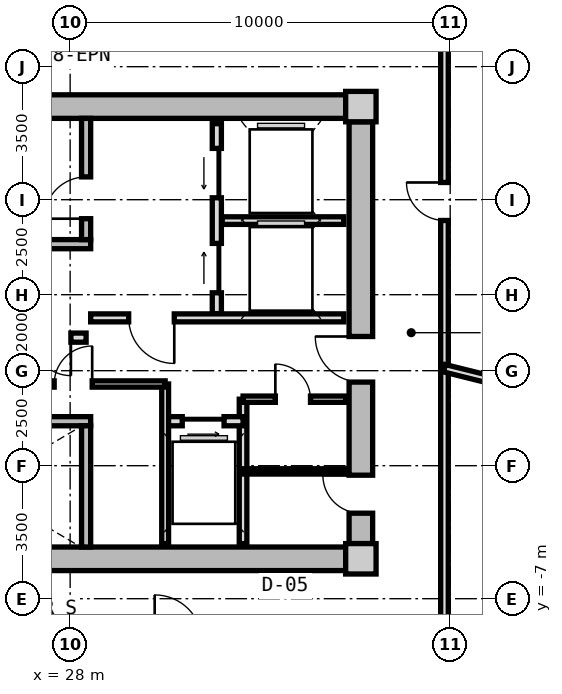
"""IFC4 building model, lengths in metres.
Left out: names, types, materials, properties, quantities, classifications, styles, units other than length and angle.
Written with IfcOpenShell. Run it as: python <this file> out.ifc"""

import sys

from ifc_helpers import new_model, si_unit, direction, frame, frame_2d, origin, origin_2d, place, context, subcontext, project, spatial, rectangle, extrude, source, transform, mapped, element, fill, save


model = new_model("IFC4")
c1 = context("Model", 3, precision=1e-05, world=origin(), true_north=direction((0.0, 1.0)))
c2 = subcontext(c1, "Body", "Model", "MODEL_VIEW")
j1 = project(units=[si_unit("LENGTHUNIT", "METRE"), si_unit("PLANEANGLEUNIT", "RADIAN")], contexts=[c1])
p1 = place(None, origin())
s1 = spatial("IfcSite", under=j1, at=p1, CompositionType="ELEMENT")
p2 = place(p1, origin())
s2 = spatial("IfcBuilding", under=s1, at=p2, CompositionType="ELEMENT")
p3 = place(p2, frame((0.0, 0.0, 186.15)))
s3 = spatial("IfcBuildingStorey", under=s2, at=p3, CompositionType="ELEMENT", Elevation=186.15)
m1 = source(origin(), c2, "Body", "SweptSolid", [
    extrude(rectangle(XDim=0.8, YDim=0.8, at=origin_2d()), origin(), (0.0, 0.0, 1.0), 4.5),
])
for number, where, z_axis, x_axis in (
    (1, (35.65, -5.95, 0.0), (0.0, 0.0, 1.0), (1.0, 0.0, 0.0)),
    (2, (35.65, 5.95, 0.0), (0.0, 0.0, 1.0), (1.0, 0.0, 0.0)),
):
    element("IfcColumn", number, at=place(p3, frame(where, z_axis=z_axis, x_axis=x_axis)), inside=s3, PredefinedType="COLUMN", context=c2, shape_type="MappedRepresentation", body=[
        mapped(m1, transform((0.0, 0.0, 0.0), x_axis=(1.0, 0.0, 0.0), y_axis=(0.0, 1.0, 0.0), z_axis=(0.0, 0.0, 1.0), scale=1.0)),
    ])
m2 = source(origin(), c2, "Body", "SweptSolid", [
    extrude(rectangle(XDim=14.5, YDim=0.62, at=frame_2d((7.25, 0.0))), origin(), (0.0, 0.0, 1.0), 4.08),
])
for number, where, z_axis, x_axis in (
    (3, (20.75, 5.95, 0.0), (0.0, 0.0, 1.0), (1.0, 0.0, 0.0)),
    (4, (35.25, -5.95, 0.0), (0.0, 0.0, 1.0), (-1.0, 0.0, 0.0)),
):
    element("IfcWall", number, at=place(p3, frame(where, z_axis=z_axis, x_axis=x_axis)), inside=s3, PredefinedType="SHEAR", context=c2, shape_type="MappedRepresentation", body=[
        mapped(m2, transform((0.0, 0.0, 0.0), x_axis=(1.0, 0.0, 0.0), y_axis=(0.0, 1.0, 0.0), z_axis=(0.0, 0.0, 1.0), scale=1.0)),
    ])
m3 = source(origin(), c2, "Body", "SweptSolid", [
    extrude(rectangle(XDim=11.1, YDim=0.62, at=frame_2d((5.55, 0.0))), origin(), (0.0, 0.0, 1.0), 4.08),
])
p4 = place(p3, frame((35.65, 5.55, 0.0), z_axis=(0.0, 0.0, 1.0), x_axis=(0.0, -1.0, 0.0)))
e5 = element("IfcWall", 5, at=p4, inside=s3, PredefinedType="SHEAR", context=c2, shape_type="MappedRepresentation", body=[
    mapped(m3, transform((0.0, 0.0, 0.0), x_axis=(1.0, 0.0, 0.0), y_axis=(0.0, 1.0, 0.0), z_axis=(0.0, 0.0, 1.0), scale=1.0)),
])
p5 = place(p4, frame((5.65, 0.0, 0.0)))
e6 = element("IfcOpeningElement", 6, at=p5, cuts=e5, PredefinedType="OPENING", context=c2, shape_type="SweptSolid", body=[
    extrude(rectangle(XDim=1.2, YDim=2.15, at=frame_2d((0.6, 1.075))), frame((0.0, 0.32, 0.0), z_axis=(0.0, -1.0, 0.0), x_axis=(1.0, 0.0, 0.0)), (0.0, 0.0, 1.0), 0.64),
])
p6 = place(p4, frame((9.3, 0.0, 0.0)))
e7 = element("IfcOpeningElement", 7, at=p6, cuts=e5, PredefinedType="OPENING", context=c2, shape_type="SweptSolid", body=[
    extrude(rectangle(XDim=1.0, YDim=2.1, at=frame_2d((0.5, 1.05))), frame((0.0, 0.32, 0.0), z_axis=(0.0, -1.0, 0.0), x_axis=(1.0, 0.0, 0.0)), (0.0, 0.0, 1.0), 0.64),
])
m4 = source(origin(), c2, "Body", "SweptSolid", [
    extrude(rectangle(XDim=7.88, YDim=0.24, at=frame_2d((3.94, 0.0))), origin(), (0.0, 0.0, 1.0), 4.08),
])
p7 = place(p3, frame((20.66, 2.33, 0.0), z_axis=(0.0, 0.0, 1.0), x_axis=(1.0, 0.0, 0.0)))
e8 = element("IfcWall", 8, at=p7, inside=s3, PredefinedType="PARTITIONING", context=c2, shape_type="MappedRepresentation", body=[
    mapped(m4, transform((0.0, 0.0, 0.0), x_axis=(1.0, 0.0, 0.0), y_axis=(0.0, 1.0, 0.0), z_axis=(0.0, 0.0, 1.0), scale=1.0)),
])
m5 = source(origin(), c2, "Body", "SweptSolid", [
    extrude(rectangle(XDim=3.19, YDim=0.24, at=frame_2d((1.595, 0.0))), origin(), (0.0, 0.0, 1.0), 4.08),
])
p8 = place(p3, frame((28.42, 2.45, 0.0), z_axis=(0.0, 0.0, 1.0), x_axis=(0.0, 1.0, 0.0)))
e9 = element("IfcWall", 9, at=p8, inside=s3, PredefinedType="PARTITIONING", context=c2, shape_type="MappedRepresentation", body=[
    mapped(m5, transform((0.0, 0.0, 0.0), x_axis=(1.0, 0.0, 0.0), y_axis=(0.0, 1.0, 0.0), z_axis=(0.0, 0.0, 1.0), scale=1.0)),
])
p9 = place(p8, frame((0.55, 0.0, 0.0)))
e10 = element("IfcOpeningElement", 10, at=p9, cuts=e9, PredefinedType="OPENING", context=c2, shape_type="SweptSolid", body=[
    extrude(rectangle(XDim=1.1, YDim=2.15, at=frame_2d((0.55, 1.075))), frame((0.0, 0.13, 0.0), z_axis=(0.0, -1.0, 0.0), x_axis=(1.0, 0.0, 0.0)), (0.0, 0.0, 1.0), 0.26),
])
p10 = place(p3, frame((20.66, -2.33, 0.0), z_axis=(0.0, 0.0, 1.0), x_axis=(1.0, 0.0, 0.0)))
e11 = element("IfcWall", 11, at=p10, inside=s3, PredefinedType="PARTITIONING", context=c2, shape_type="MappedRepresentation", body=[
    mapped(m4, transform((0.0, 0.0, 0.0), x_axis=(1.0, 0.0, 0.0), y_axis=(0.0, 1.0, 0.0), z_axis=(0.0, 0.0, 1.0), scale=1.0)),
])
p11 = place(p10, frame((1.0, 0.0, 0.0)))
e12 = element("IfcOpeningElement", 12, at=p11, cuts=e11, PredefinedType="OPENING", context=c2, shape_type="SweptSolid", body=[
    extrude(rectangle(XDim=1.1, YDim=2.15, at=frame_2d((0.55, 1.075))), frame((0.0, 0.13, 0.0), z_axis=(0.0, -1.0, 0.0), x_axis=(1.0, 0.0, 0.0)), (0.0, 0.0, 1.0), 0.26),
])
p12 = place(p3, frame((28.42, -5.64, 0.0), z_axis=(0.0, 0.0, 1.0), x_axis=(0.0, 1.0, 0.0)))
e13 = element("IfcWall", 13, at=p12, inside=s3, PredefinedType="PARTITIONING", context=c2, shape_type="MappedRepresentation", body=[
    mapped(m5, transform((0.0, 0.0, 0.0), x_axis=(1.0, 0.0, 0.0), y_axis=(0.0, 1.0, 0.0), z_axis=(0.0, 0.0, 1.0), scale=1.0)),
])
m6 = source(origin(), c2, "Body", "SweptSolid", [
    extrude(rectangle(XDim=5.0, YDim=0.24, at=frame_2d((2.5, 0.0))), origin(), (0.0, 0.0, 1.0), 4.065),
])
p13 = place(p3, frame((31.86, 0.5, 0.0), z_axis=(0.0, 0.0, 1.0), x_axis=(0.0, 1.0, 0.0)))
e14 = element("IfcWall", 14, at=p13, inside=s3, PredefinedType="PARTITIONING", context=c2, shape_type="MappedRepresentation", body=[
    mapped(m6, transform((0.0, 0.0, 0.0), x_axis=(1.0, 0.0, 0.0), y_axis=(0.0, 1.0, 0.0), z_axis=(0.0, 0.0, 1.0), scale=1.0)),
])
p14 = place(p13, frame((3.05, 0.0, 0.0)))
e15 = element("IfcOpeningElement", 15, at=p14, cuts=e14, PredefinedType="OPENING", context=c2, shape_type="SweptSolid", body=[
    extrude(rectangle(XDim=1.3, YDim=2.2, at=frame_2d((0.65, 1.1))), frame((0.0, 0.13, 0.0), z_axis=(0.0, -1.0, 0.0), x_axis=(1.0, 0.0, 0.0)), (0.0, 0.0, 1.0), 0.26),
])
p15 = place(p13, frame((0.55, 0.0, 0.0)))
e16 = element("IfcOpeningElement", 16, at=p15, cuts=e14, PredefinedType="OPENING", context=c2, shape_type="SweptSolid", body=[
    extrude(rectangle(XDim=1.3, YDim=2.2, at=frame_2d((0.65, 1.1))), frame((0.0, 0.13, 0.0), z_axis=(0.0, -1.0, 0.0), x_axis=(1.0, 0.0, 0.0)), (0.0, 0.0, 1.0), 0.26),
])
m7 = source(origin(), c2, "Body", "SweptSolid", [
    extrude(rectangle(XDim=3.2, YDim=0.2, at=frame_2d((1.6, 0.0))), origin(), (0.0, 0.0, 1.0), 4.065),
])
p16 = place(p3, frame((32.0, 2.95, 0.0), z_axis=(0.0, 0.0, 1.0), x_axis=(1.0, 0.0, 0.0)))
e17 = element("IfcWall", 17, at=p16, inside=s3, PredefinedType="PARTITIONING", context=c2, shape_type="MappedRepresentation", body=[
    mapped(m7, transform((0.0, 0.0, 0.0), x_axis=(1.0, 0.0, 0.0), y_axis=(0.0, 1.0, 0.0), z_axis=(0.0, 0.0, 1.0), scale=1.0)),
])
m8 = source(origin(), c2, "Body", "SweptSolid", [
    extrude(rectangle(XDim=6.66, YDim=0.21, at=frame_2d((3.33, 0.0))), origin(), (0.0, 0.0, 1.0), 4.065),
])
p17 = place(p3, frame((28.54, 0.39, 0.0), z_axis=(0.0, 0.0, 1.0), x_axis=(1.0, 0.0, 0.0)))
e18 = element("IfcWall", 18, at=p17, inside=s3, PredefinedType="PARTITIONING", context=c2, shape_type="MappedRepresentation", body=[
    mapped(m8, transform((0.0, 0.0, 0.0), x_axis=(1.0, 0.0, 0.0), y_axis=(0.0, 1.0, 0.0), z_axis=(0.0, 0.0, 1.0), scale=1.0)),
])
p18 = place(p17, frame((1.0, 0.0, 0.0)))
e19 = element("IfcOpeningElement", 19, at=p18, cuts=e18, PredefinedType="OPENING", context=c2, shape_type="SweptSolid", body=[
    extrude(rectangle(XDim=1.2, YDim=2.15, at=frame_2d((0.6, 1.075))), frame((0.0, 0.115, 0.0), z_axis=(0.0, -1.0, 0.0), x_axis=(1.0, 0.0, 0.0)), (0.0, 0.0, 1.0), 0.23),
])
m9 = source(origin(), c2, "Body", "SweptSolid", [
    extrude(rectangle(XDim=7.62, YDim=0.24, at=frame_2d((3.81, 0.0))), origin(), (0.0, 0.0, 1.0), 4.065),
])
p19 = place(p3, frame((20.8, -0.13, 0.0), z_axis=(0.0, 0.0, 1.0), x_axis=(1.0, 0.0, 0.0)))
e20 = element("IfcWall", 20, at=p19, inside=s3, PredefinedType="PARTITIONING", context=c2, shape_type="MappedRepresentation", body=[
    mapped(m9, transform((0.0, 0.0, 0.0), x_axis=(1.0, 0.0, 0.0), y_axis=(0.0, 1.0, 0.0), z_axis=(0.0, 0.0, 1.0), scale=1.0)),
])
p20 = place(p19, frame((6.22, 0.0, 0.0)))
e21 = element("IfcOpeningElement", 21, at=p20, cuts=e20, PredefinedType="OPENING", context=c2, shape_type="SweptSolid", body=[
    extrude(rectangle(XDim=1.0, YDim=2.1, at=frame_2d((0.5, 1.05))), frame((0.0, 0.13, 0.0), z_axis=(0.0, -1.0, 0.0), x_axis=(1.0, 0.0, 0.0)), (0.0, 0.0, 1.0), 0.26),
])
p21 = place(p19, frame((2.4, 0.0, 0.0)))
e22 = element("IfcOpeningElement", 22, at=p21, cuts=e20, PredefinedType="OPENING", context=c2, shape_type="SweptSolid", body=[
    extrude(rectangle(XDim=1.0, YDim=2.1, at=frame_2d((0.5, 1.05))), frame((0.0, 0.13, 0.0), z_axis=(0.0, -1.0, 0.0), x_axis=(1.0, 0.0, 0.0)), (0.0, 0.0, 1.0), 0.26),
])
m10 = source(origin(), c2, "Body", "SweptSolid", [
    extrude(rectangle(XDim=3.8, YDim=0.2, at=frame_2d((1.9, 0.0))), origin(), (0.0, 0.0, 1.0), 4.065),
])
p22 = place(p3, frame((32.55, -5.55, 0.0), z_axis=(0.0, 0.0, 1.0), x_axis=(0.0, 1.0, 0.0)))
e23 = element("IfcWall", 23, at=p22, inside=s3, PredefinedType="PARTITIONING", context=c2, shape_type="MappedRepresentation", body=[
    mapped(m10, transform((0.0, 0.0, 0.0), x_axis=(1.0, 0.0, 0.0), y_axis=(0.0, 1.0, 0.0), z_axis=(0.0, 0.0, 1.0), scale=1.0)),
])
m11 = source(origin(), c2, "Body", "SweptSolid", [
    extrude(rectangle(XDim=2.05, YDim=0.24, at=frame_2d((1.025, 0.0))), origin(), (0.0, 0.0, 1.0), 4.065),
])
p23 = place(p3, frame((30.5, -2.33, 0.0), z_axis=(0.0, 0.0, 1.0), x_axis=(1.0, 0.0, 0.0)))
e24 = element("IfcWall", 24, at=p23, inside=s3, PredefinedType="PARTITIONING", context=c2, shape_type="MappedRepresentation", body=[
    mapped(m11, transform((0.0, 0.0, 0.0), x_axis=(1.0, 0.0, 0.0), y_axis=(0.0, 1.0, 0.0), z_axis=(0.0, 0.0, 1.0), scale=1.0)),
])
p24 = place(p23, frame((0.45, 0.0, 0.0)))
e25 = element("IfcOpeningElement", 25, at=p24, cuts=e24, PredefinedType="OPENING", context=c2, shape_type="SweptSolid", body=[
    extrude(rectangle(XDim=1.1, YDim=2.2, at=frame_2d((0.55, 1.1))), frame((0.0, 0.13, 0.0), z_axis=(0.0, -1.0, 0.0), x_axis=(1.0, 0.0, 0.0)), (0.0, 0.0, 1.0), 0.26),
])
m12 = source(origin(), c2, "Body", "SweptSolid", [
    extrude(rectangle(XDim=4.2, YDim=0.18, at=frame_2d((2.1, 0.0))), origin(), (0.0, 0.0, 1.0), 4.065),
])
p25 = place(p3, frame((30.5, -5.55, 0.0), z_axis=(0.0, 0.0, 1.0), x_axis=(0.0, 1.0, 0.0)))
e26 = element("IfcWall", 26, at=p25, inside=s3, PredefinedType="PARTITIONING", context=c2, shape_type="MappedRepresentation", body=[
    mapped(m12, transform((0.0, 0.0, 0.0), x_axis=(1.0, 0.0, 0.0), y_axis=(0.0, 1.0, 0.0), z_axis=(0.0, 0.0, 1.0), scale=1.0)),
])
m13 = source(origin(), c2, "Body", "SweptSolid", [
    extrude(rectangle(XDim=4.77, YDim=0.165, at=frame_2d((2.385, 0.0))), origin(), (0.0, 0.0, 1.0), 4.065),
])
p26 = place(p3, frame((25.73, -1.35, 0.0), z_axis=(0.0, 0.0, 1.0), x_axis=(1.0, 0.0, 0.0)))
e27 = element("IfcWall", 27, at=p26, inside=s3, PredefinedType="PARTITIONING", context=c2, shape_type="MappedRepresentation", body=[
    mapped(m13, transform((0.0, 0.0, 0.0), x_axis=(1.0, 0.0, 0.0), y_axis=(0.0, 1.0, 0.0), z_axis=(0.0, 0.0, 1.0), scale=1.0)),
])
p27 = place(p26, frame((1.85, 0.0, 0.0)))
e28 = element("IfcOpeningElement", 28, at=p27, cuts=e27, PredefinedType="OPENING", context=c2, shape_type="SweptSolid", body=[
    extrude(rectangle(XDim=1.0, YDim=2.1, at=frame_2d((0.5, 1.05))), frame((0.0, 0.093, 0.0), z_axis=(0.0, -1.0, 0.0), x_axis=(1.0, 0.0, 0.0)), (0.0, 0.0, 1.0), 0.185),
])
m14 = source(origin(), c2, "Body", "SweptSolid", [
    extrude(rectangle(XDim=2.7, YDim=0.165, at=frame_2d((1.35, 0.0))), origin(), (0.0, 0.0, 1.0), 4.065),
])
p28 = place(p3, frame((32.55, -1.75, 0.0), z_axis=(0.0, 0.0, 1.0), x_axis=(1.0, 0.0, 0.0)))
e29 = element("IfcWall", 29, at=p28, inside=s3, PredefinedType="PARTITIONING", context=c2, shape_type="MappedRepresentation", body=[
    mapped(m14, transform((0.0, 0.0, 0.0), x_axis=(1.0, 0.0, 0.0), y_axis=(0.0, 1.0, 0.0), z_axis=(0.0, 0.0, 1.0), scale=1.0)),
])
p29 = place(p28, frame((0.85, 0.0, 0.0)))
e30 = element("IfcOpeningElement", 30, at=p29, cuts=e29, PredefinedType="OPENING", context=c2, shape_type="SweptSolid", body=[
    extrude(rectangle(XDim=0.925, YDim=2.1, at=frame_2d((0.462, 1.05))), frame((0.0, 0.093, 0.0), z_axis=(0.0, -1.0, 0.0), x_axis=(1.0, 0.0, 0.0)), (0.0, 0.0, 1.0), 0.185),
])
m15 = source(origin(), c2, "Body", "SweptSolid", [
    extrude(rectangle(XDim=2.7, YDim=0.14, at=frame_2d((1.35, 0.0))), origin(), (0.0, 0.0, 1.0), 4.065),
])
p30 = place(p3, frame((32.55, -3.65, 0.0), z_axis=(0.0, 0.0, 1.0), x_axis=(1.0, 0.0, 0.0)))
e31 = element("IfcWall", 31, at=p30, inside=s3, PredefinedType="PARTITIONING", context=c2, shape_type="MappedRepresentation", body=[
    mapped(m15, transform((0.0, 0.0, 0.0), x_axis=(1.0, 0.0, 0.0), y_axis=(0.0, 1.0, 0.0), z_axis=(0.0, 0.0, 1.0), scale=1.0)),
])
m16 = source(origin(), c2, "Body", "SweptSolid", [
    extrude(rectangle(XDim=16.3, YDim=0.2, at=frame_2d((8.15, 0.0))), origin(), (0.0, 0.0, 1.0), 4.065),
])
p31 = place(p3, frame((37.85, 8.15, 0.0), z_axis=(0.0, 0.0, 1.0), x_axis=(0.0, -1.0, 0.0)))
e32 = element("IfcWall", 32, at=p31, inside=s3, PredefinedType="PARTITIONING", context=c2, shape_type="MappedRepresentation", body=[
    mapped(m16, transform((0.0, 0.0, 0.0), x_axis=(1.0, 0.0, 0.0), y_axis=(0.0, 1.0, 0.0), z_axis=(0.0, 0.0, 1.0), scale=1.0)),
])
p32 = place(p31, frame((4.197, 0.0, 0.0)))
e33 = element("IfcOpeningElement", 33, at=p32, cuts=e32, PredefinedType="OPENING", context=c2, shape_type="SweptSolid", body=[
    extrude(rectangle(XDim=1.0, YDim=2.1, at=frame_2d((0.5, 1.05))), frame((0.0, 0.11, 0.0), z_axis=(0.0, -1.0, 0.0), x_axis=(1.0, 0.0, 0.0)), (0.0, 0.0, 1.0), 0.22),
])
m17 = source(origin(), c2, "Body", "SweptSolid", [
    extrude(rectangle(XDim=5.914, YDim=0.2, at=frame_2d((2.957, 0.0))), origin(), (0.0, 0.0, 1.0), 4.065),
])
p33 = place(p3, frame((37.85, -0.935, 0.0), z_axis=(0.0, 0.0, 1.0), x_axis=(0.970312235668, -0.241855670415, 0.0)))
e34 = element("IfcWall", 34, at=p33, inside=s3, PredefinedType="PARTITIONING", context=c2, shape_type="MappedRepresentation", body=[
    mapped(m17, transform((0.0, 0.0, 0.0), x_axis=(1.0, 0.0, 0.0), y_axis=(0.0, 1.0, 0.0), z_axis=(0.0, 0.0, 1.0), scale=1.0)),
])
m18 = source(origin(), c2, "Body", "SweptSolid", [
    extrude(rectangle(XDim=1.1, YDim=2.15, at=frame_2d((0.55, 1.075))), frame((0.0, 0.025, 0.0), z_axis=(0.0, -1.0, 0.0), x_axis=(1.0, 0.0, 0.0)), (0.0, 0.0, 1.0), 0.05),
])
p34 = place(p9, origin())
e35 = element("IfcDoor", 35, at=p34, inside=s3, OperationType="SINGLE_SWING_LEFT", PredefinedType="DOOR", context=c2, shape_type="MappedRepresentation", body=[
    mapped(m18, transform((0.0, 0.0, 0.0), x_axis=(1.0, 0.0, 0.0), y_axis=(0.0, 1.0, 0.0), z_axis=(0.0, 0.0, 1.0), scale=1.0)),
])
fill(e10, e35)
m19 = source(origin(), c2, "Body", "SweptSolid", [
    extrude(rectangle(XDim=1.3, YDim=2.2, at=frame_2d((0.65, 1.1))), frame((0.0, 0.025, 0.0), z_axis=(0.0, -1.0, 0.0), x_axis=(1.0, 0.0, 0.0)), (0.0, 0.0, 1.0), 0.05),
])
p35 = place(p14, origin())
e36 = element("IfcDoor", 36, at=p35, inside=s3, OperationType="SLIDING_TO_LEFT", PredefinedType="DOOR", context=c2, shape_type="MappedRepresentation", body=[
    mapped(m19, transform((0.0, 0.0, 0.0), x_axis=(1.0, 0.0, 0.0), y_axis=(0.0, 1.0, 0.0), z_axis=(0.0, 0.0, 1.0), scale=1.0)),
])
fill(e15, e36)
p36 = place(p15, origin())
e37 = element("IfcDoor", 37, at=p36, inside=s3, OperationType="SLIDING_TO_RIGHT", PredefinedType="DOOR", context=c2, shape_type="MappedRepresentation", body=[
    mapped(m19, transform((0.0, 0.0, 0.0), x_axis=(1.0, 0.0, 0.0), y_axis=(0.0, 1.0, 0.0), z_axis=(0.0, 0.0, 1.0), scale=1.0)),
])
fill(e16, e37)
m20 = source(origin(), c2, "Body", "SweptSolid", [
    extrude(rectangle(XDim=1.2, YDim=2.15, at=frame_2d((0.6, 1.075))), frame((0.0, 0.025, 0.0), z_axis=(0.0, -1.0, 0.0), x_axis=(1.0, 0.0, 0.0)), (0.0, 0.0, 1.0), 0.05),
])
p37 = place(p18, frame((1.2, 0.0, 0.0), z_axis=(0.0, 0.0, 1.0), x_axis=(-1.0, 0.0, 0.0)))
e38 = element("IfcDoor", 38, at=p37, inside=s3, OperationType="SINGLE_SWING_LEFT", PredefinedType="DOOR", context=c2, shape_type="MappedRepresentation", body=[
    mapped(m20, transform((0.0, 0.0, 0.0), x_axis=(1.0, 0.0, 0.0), y_axis=(0.0, 1.0, 0.0), z_axis=(0.0, 0.0, 1.0), scale=1.0)),
])
fill(e19, e38)
p38 = place(p5, frame((1.2, 0.0, 0.0), z_axis=(0.0, 0.0, 1.0), x_axis=(-1.0, 0.0, 0.0)))
e39 = element("IfcDoor", 39, at=p38, inside=s3, OperationType="SINGLE_SWING_RIGHT", PredefinedType="DOOR", context=c2, shape_type="MappedRepresentation", body=[
    mapped(m20, transform((0.0, 0.0, 0.0), x_axis=(1.0, 0.0, 0.0), y_axis=(0.0, 1.0, 0.0), z_axis=(0.0, 0.0, 1.0), scale=1.0)),
])
fill(e6, e39)
m21 = source(origin(), c2, "Body", "SweptSolid", [
    extrude(rectangle(XDim=1.0, YDim=2.1, at=frame_2d((0.5, 1.05))), frame((0.0, 0.025, 0.0), z_axis=(0.0, -1.0, 0.0), x_axis=(1.0, 0.0, 0.0)), (0.0, 0.0, 1.0), 0.05),
])
p39 = place(p20, frame((1.0, 0.0, 0.0), z_axis=(0.0, 0.0, 1.0), x_axis=(-1.0, 0.0, 0.0)))
e40 = element("IfcDoor", 40, at=p39, inside=s3, OperationType="SINGLE_SWING_LEFT", PredefinedType="DOOR", context=c2, shape_type="MappedRepresentation", body=[
    mapped(m21, transform((0.0, 0.0, 0.0), x_axis=(1.0, 0.0, 0.0), y_axis=(0.0, 1.0, 0.0), z_axis=(0.0, 0.0, 1.0), scale=1.0)),
])
fill(e21, e40)
m22 = source(origin(), c2, "Body", "SweptSolid", [
    extrude(rectangle(XDim=1.1, YDim=2.2, at=frame_2d((0.55, 1.1))), frame((0.0, 0.025, 0.0), z_axis=(0.0, -1.0, 0.0), x_axis=(1.0, 0.0, 0.0)), (0.0, 0.0, 1.0), 0.05),
])
p40 = place(p24, frame((1.1, 0.0, 0.0), z_axis=(0.0, 0.0, 1.0), x_axis=(-1.0, 0.0, 0.0)))
e41 = element("IfcDoor", 41, at=p40, inside=s3, OperationType="SLIDING_TO_RIGHT", PredefinedType="DOOR", context=c2, shape_type="MappedRepresentation", body=[
    mapped(m22, transform((0.0, 0.0, 0.0), x_axis=(1.0, 0.0, 0.0), y_axis=(0.0, 1.0, 0.0), z_axis=(0.0, 0.0, 1.0), scale=1.0)),
])
fill(e25, e41)
p41 = place(p27, origin())
e42 = element("IfcDoor", 42, at=p41, inside=s3, OperationType="SINGLE_SWING_RIGHT", PredefinedType="DOOR", context=c2, shape_type="MappedRepresentation", body=[
    mapped(m21, transform((0.0, 0.0, 0.0), x_axis=(1.0, 0.0, 0.0), y_axis=(0.0, 1.0, 0.0), z_axis=(0.0, 0.0, 1.0), scale=1.0)),
])
fill(e28, e42)
m23 = source(origin(), c2, "Body", "SweptSolid", [
    extrude(rectangle(XDim=0.925, YDim=2.1, at=frame_2d((0.462, 1.05))), frame((0.0, 0.025, 0.0), z_axis=(0.0, -1.0, 0.0), x_axis=(1.0, 0.0, 0.0)), (0.0, 0.0, 1.0), 0.05),
])
p42 = place(p29, origin())
e43 = element("IfcDoor", 43, at=p42, inside=s3, OperationType="SINGLE_SWING_LEFT", PredefinedType="DOOR", context=c2, shape_type="MappedRepresentation", body=[
    mapped(m23, transform((0.0, 0.0, 0.0), x_axis=(1.0, 0.0, 0.0), y_axis=(0.0, 1.0, 0.0), z_axis=(0.0, 0.0, 1.0), scale=1.0)),
])
fill(e30, e43)
p43 = place(p6, frame((1.0, 0.0, 0.0), z_axis=(0.0, 0.0, 1.0), x_axis=(-1.0, 0.0, 0.0)))
e44 = element("IfcDoor", 44, at=p43, inside=s3, OperationType="SINGLE_SWING_RIGHT", PredefinedType="DOOR", context=c2, shape_type="MappedRepresentation", body=[
    mapped(m21, transform((0.0, 0.0, 0.0), x_axis=(1.0, 0.0, 0.0), y_axis=(0.0, 1.0, 0.0), z_axis=(0.0, 0.0, 1.0), scale=1.0)),
])
fill(e7, e44)
p44 = place(p32, frame((1.0, 0.0, 0.0), z_axis=(0.0, 0.0, 1.0), x_axis=(-1.0, 0.0, 0.0)))
e45 = element("IfcDoor", 45, at=p44, inside=s3, OperationType="SINGLE_SWING_RIGHT", PredefinedType="DOOR", context=c2, shape_type="MappedRepresentation", body=[
    mapped(m21, transform((0.0, 0.0, 0.0), x_axis=(1.0, 0.0, 0.0), y_axis=(0.0, 1.0, 0.0), z_axis=(0.0, 0.0, 1.0), scale=1.0)),
])
fill(e33, e45)
save(model, sys.argv[1])
